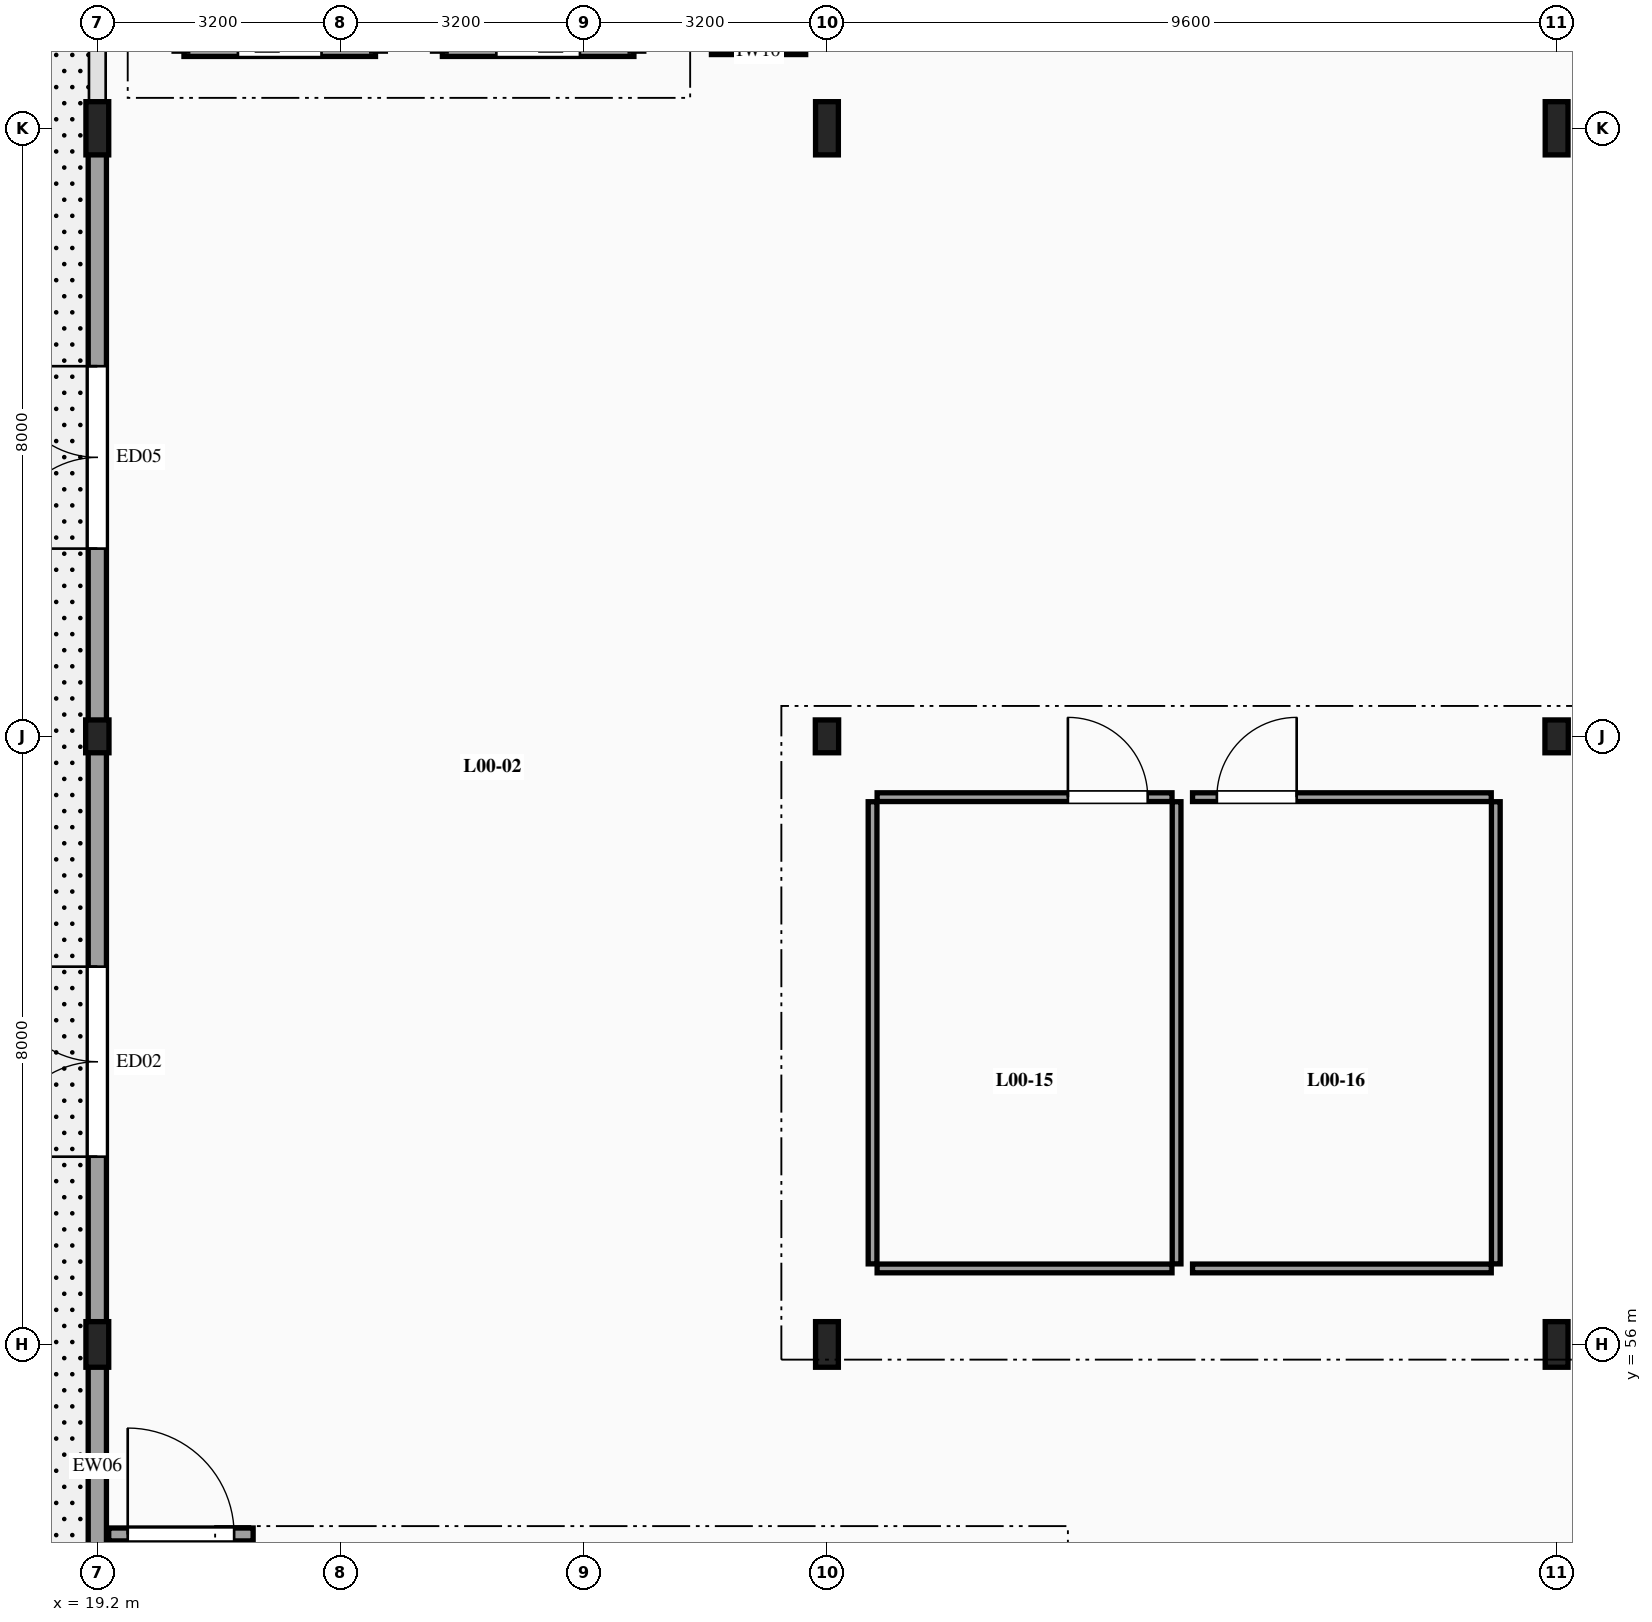
"""IFC4 building model, lengths in metres.
Left out: names, types, materials, properties, quantities, classifications, styles, units other than length and angle.
Written with IfcOpenShell. Run it as: python <this file> out.ifc"""

import sys

from ifc_helpers import new_model, si_unit, direction, frame, frame_2d, origin, origin_2d, place, context, subcontext, project, spatial, rectangle, i_section, extrude, element, fill, save


model = new_model("IFC4")
c1 = context("Model", 3, precision=1e-05, world=origin(), true_north=direction((0.0, 1.0)))
c2 = subcontext(c1, "Body", "Model", "MODEL_VIEW")
j1 = project(units=[si_unit("LENGTHUNIT", "METRE"), si_unit("PLANEANGLEUNIT", "RADIAN")], contexts=[c1])
p1 = place(None, origin())
s1 = spatial("IfcSite", under=j1, at=p1, CompositionType="ELEMENT")
p2 = place(p1, origin())
s2 = spatial("IfcBuilding", under=s1, at=p2, CompositionType="ELEMENT")
p3 = place(p2, origin())
s3 = spatial("IfcBuildingStorey", under=s2, at=p3, CompositionType="ELEMENT", Elevation=0.0)
p4 = place(p3, frame((19.2, 56.0, -0.28), z_axis=(0.0, 0.0, 1.0), x_axis=(1.0, 0.0, 0.0)))
e1 = element("IfcColumn", 1, at=p4, inside=s3, PredefinedType="COLUMN", context=c2, shape_type="SweptSolid", body=[
    extrude(i_section(OverallWidth=0.3, OverallDepth=0.6, WebThickness=0.015, FlangeThickness=0.03, FilletRadius=0.027, at=origin_2d()), origin(), (0.0, 0.0, 1.0), 4.52),
])
p5 = place(p3, frame((19.2, 64.0, -0.28), z_axis=(0.0, 0.0, 1.0), x_axis=(1.0, 0.0, 0.0)))
e2 = element("IfcColumn", 2, at=p5, inside=s3, PredefinedType="COLUMN", context=c2, shape_type="SweptSolid", body=[
    extrude(i_section(OverallWidth=0.307, OverallDepth=0.432, WebThickness=0.021, FlangeThickness=0.04, FilletRadius=0.027, at=origin_2d()), origin(), (0.0, 0.0, 1.0), 4.52),
])
p6 = place(p3, frame((19.2, 72.0, -0.28), z_axis=(0.0, 0.0, 1.0), x_axis=(1.0, 0.0, 0.0)))
e3 = element("IfcColumn", 3, at=p6, inside=s3, PredefinedType="COLUMN", context=c2, shape_type="SweptSolid", body=[
    extrude(i_section(OverallWidth=0.3, OverallDepth=0.7, WebThickness=0.017, FlangeThickness=0.032, FilletRadius=0.027, at=origin_2d()), origin(), (0.0, 0.0, 1.0), 4.52),
])
p7 = place(p3, frame((28.8, 56.0, -0.28), z_axis=(0.0, 0.0, 1.0), x_axis=(1.0, 0.0, 0.0)))
e4 = element("IfcColumn", 4, at=p7, inside=s3, PredefinedType="COLUMN", context=c2, shape_type="SweptSolid", body=[
    extrude(i_section(OverallWidth=0.3, OverallDepth=0.6, WebThickness=0.015, FlangeThickness=0.03, FilletRadius=0.027, at=origin_2d()), origin(), (0.0, 0.0, 1.0), 4.52),
])
p8 = place(p3, frame((28.8, 64.0, -0.28), z_axis=(0.0, 0.0, 1.0), x_axis=(1.0, 0.0, 0.0)))
e5 = element("IfcColumn", 5, at=p8, inside=s3, PredefinedType="COLUMN", context=c2, shape_type="SweptSolid", body=[
    extrude(i_section(OverallWidth=0.307, OverallDepth=0.432, WebThickness=0.021, FlangeThickness=0.04, FilletRadius=0.027, at=origin_2d()), origin(), (0.0, 0.0, 1.0), 4.52),
])
p9 = place(p3, frame((28.8, 72.0, -0.28), z_axis=(0.0, 0.0, 1.0), x_axis=(1.0, 0.0, 0.0)))
e6 = element("IfcColumn", 6, at=p9, inside=s3, PredefinedType="COLUMN", context=c2, shape_type="SweptSolid", body=[
    extrude(i_section(OverallWidth=0.3, OverallDepth=0.7, WebThickness=0.017, FlangeThickness=0.032, FilletRadius=0.027, at=origin_2d()), origin(), (0.0, 0.0, 1.0), 4.52),
])
p10 = place(p3, frame((38.4, 56.0, -0.28), z_axis=(0.0, 0.0, 1.0), x_axis=(1.0, 0.0, 0.0)))
e7 = element("IfcColumn", 7, at=p10, inside=s3, PredefinedType="COLUMN", context=c2, shape_type="SweptSolid", body=[
    extrude(i_section(OverallWidth=0.3, OverallDepth=0.6, WebThickness=0.015, FlangeThickness=0.03, FilletRadius=0.027, at=origin_2d()), origin(), (0.0, 0.0, 1.0), 4.52),
])
p11 = place(p3, frame((38.4, 64.0, -0.28), z_axis=(0.0, 0.0, 1.0), x_axis=(1.0, 0.0, 0.0)))
e8 = element("IfcColumn", 8, at=p11, inside=s3, PredefinedType="COLUMN", context=c2, shape_type="SweptSolid", body=[
    extrude(i_section(OverallWidth=0.307, OverallDepth=0.432, WebThickness=0.021, FlangeThickness=0.04, FilletRadius=0.027, at=origin_2d()), origin(), (0.0, 0.0, 1.0), 4.52),
])
p12 = place(p3, frame((38.4, 72.0, -0.28), z_axis=(0.0, 0.0, 1.0), x_axis=(1.0, 0.0, 0.0)))
e9 = element("IfcColumn", 9, at=p12, inside=s3, PredefinedType="COLUMN", context=c2, shape_type="SweptSolid", body=[
    extrude(i_section(OverallWidth=0.3, OverallDepth=0.7, WebThickness=0.017, FlangeThickness=0.032, FilletRadius=0.027, at=origin_2d()), origin(), (0.0, 0.0, 1.0), 4.52),
])
p13 = place(p3, frame((19.2, 48.02, 0.0), z_axis=(0.0, 0.0, 1.0), x_axis=(0.0, 1.0, 0.0)))
e10 = element("IfcWall", 10, at=p13, inside=s3, PredefinedType="SOLIDWALL", context=c2, shape_type="SweptSolid", body=[
    extrude(rectangle(XDim=7.96, YDim=0.24, at=frame_2d((3.98, 0.0))), origin(), (0.0, 0.0, 1.0), 3.56),
])
p14 = place(p13, frame((2.45, 0.0, 0.0)))
e11 = element("IfcOpeningElement", 11, at=p14, cuts=e10, PredefinedType="OPENING", context=c2, shape_type="SweptSolid", body=[
    extrude(rectangle(XDim=2.1, YDim=2.4, at=frame_2d((1.05, 1.2))), frame((0.0, 0.13, 0.0), z_axis=(0.0, -1.0, 0.0), x_axis=(1.0, 0.0, 0.0)), (0.0, 0.0, 1.0), 0.26),
])
p15 = place(p3, frame((19.2, 56.02, 0.0), z_axis=(0.0, 0.0, 1.0), x_axis=(0.0, 1.0, 0.0)))
e12 = element("IfcWall", 12, at=p15, inside=s3, PredefinedType="SOLIDWALL", context=c2, shape_type="SweptSolid", body=[
    extrude(rectangle(XDim=7.96, YDim=0.24, at=frame_2d((3.98, 0.0))), origin(), (0.0, 0.0, 1.0), 3.56),
])
p16 = place(p15, frame((2.45, 0.0, 0.0)))
e13 = element("IfcOpeningElement", 13, at=p16, cuts=e12, PredefinedType="OPENING", context=c2, shape_type="SweptSolid", body=[
    extrude(rectangle(XDim=2.5, YDim=2.5, at=frame_2d((1.25, 1.25))), frame((0.0, 0.13, 0.0), z_axis=(0.0, -1.0, 0.0), x_axis=(1.0, 0.0, 0.0)), (0.0, 0.0, 1.0), 0.26),
])
p17 = place(p3, frame((19.2, 64.02, 0.0), z_axis=(0.0, 0.0, 1.0), x_axis=(0.0, 1.0, 0.0)))
e14 = element("IfcWall", 14, at=p17, inside=s3, PredefinedType="SOLIDWALL", context=c2, shape_type="SweptSolid", body=[
    extrude(rectangle(XDim=7.96, YDim=0.24, at=frame_2d((3.98, 0.0))), origin(), (0.0, 0.0, 1.0), 3.56),
])
p18 = place(p17, frame((2.45, 0.0, 0.0)))
e15 = element("IfcOpeningElement", 15, at=p18, cuts=e14, PredefinedType="OPENING", context=c2, shape_type="SweptSolid", body=[
    extrude(rectangle(XDim=2.4, YDim=2.55, at=frame_2d((1.2, 1.275))), frame((0.0, 0.13, 0.0), z_axis=(0.0, -1.0, 0.0), x_axis=(1.0, 0.0, 0.0)), (0.0, 0.0, 1.0), 0.26),
])
p19 = place(p3, frame((19.35, 53.5, 0.0), z_axis=(0.0, 0.0, 1.0), x_axis=(1.0, 0.0, 0.0)))
e16 = element("IfcWall", 16, at=p19, inside=s3, PredefinedType="SOLIDWALL", context=c2, shape_type="SweptSolid", body=[
    extrude(rectangle(XDim=1.9, YDim=0.17, at=frame_2d((0.95, 0.0))), origin(), (0.0, 0.0, 1.0), 3.6),
])
p20 = place(p19, frame((0.25, 0.0, 0.0)))
e17 = element("IfcOpeningElement", 17, at=p20, cuts=e16, PredefinedType="OPENING", context=c2, shape_type="SweptSolid", body=[
    extrude(rectangle(XDim=1.4, YDim=2.15, at=frame_2d((0.7, 1.075))), frame((0.0, 0.095, 0.0), z_axis=(0.0, -1.0, 0.0), x_axis=(1.0, 0.0, 0.0)), (0.0, 0.0, 1.0), 0.19),
])
p21 = place(p3, frame((20.34, 73.06, 0.0), z_axis=(0.0, 0.0, 1.0), x_axis=(1.0, 0.0, 0.0)))
e18 = element("IfcWall", 18, at=p21, inside=s3, PredefinedType="SOLIDWALL", context=c2, shape_type="SweptSolid", body=[
    extrude(rectangle(XDim=2.52, YDim=0.23, at=frame_2d((1.26, 0.0))), origin(), (0.0, 0.0, 1.0), 3.6),
])
p22 = place(p21, frame((0.71, 0.0, 0.0)))
e19 = element("IfcOpeningElement", 19, at=p22, cuts=e18, PredefinedType="OPENING", context=c2, shape_type="SweptSolid", body=[
    extrude(rectangle(XDim=1.1, YDim=2.2, at=frame_2d((0.55, 1.1))), frame((0.0, 0.125, 0.0), z_axis=(0.0, -1.0, 0.0), x_axis=(1.0, 0.0, 0.0)), (0.0, 0.0, 1.0), 0.25),
])
p23 = place(p3, frame((23.74, 73.06, 0.0), z_axis=(0.0, 0.0, 1.0), x_axis=(1.0, 0.0, 0.0)))
e20 = element("IfcWall", 20, at=p23, inside=s3, PredefinedType="SOLIDWALL", context=c2, shape_type="SweptSolid", body=[
    extrude(rectangle(XDim=2.52, YDim=0.23, at=frame_2d((1.26, 0.0))), origin(), (0.0, 0.0, 1.0), 3.6),
])
p24 = place(p23, frame((0.71, 0.0, 0.0)))
e21 = element("IfcOpeningElement", 21, at=p24, cuts=e20, PredefinedType="OPENING", context=c2, shape_type="SweptSolid", body=[
    extrude(rectangle(XDim=1.1, YDim=2.2, at=frame_2d((0.55, 1.1))), frame((0.0, 0.125, 0.0), z_axis=(0.0, -1.0, 0.0), x_axis=(1.0, 0.0, 0.0)), (0.0, 0.0, 1.0), 0.25),
])
p25 = place(p3, frame((29.46, 63.2, 0.0), z_axis=(0.0, 0.0, 1.0), x_axis=(1.0, 0.0, 0.0)))
e22 = element("IfcWall", 22, at=p25, inside=s3, PredefinedType="PARTITIONING", context=c2, shape_type="SweptSolid", body=[
    extrude(rectangle(XDim=3.88, YDim=0.115, at=frame_2d((1.94, 0.0))), origin(), (0.0, 0.0, 1.0), 3.6),
])
p26 = place(p25, frame((2.51, 0.0, 0.0)))
e23 = element("IfcOpeningElement", 23, at=p26, cuts=e22, PredefinedType="OPENING", context=c2, shape_type="SweptSolid", body=[
    extrude(rectangle(XDim=1.05, YDim=2.15, at=frame_2d((0.525, 1.075))), frame((0.0, 0.067, 0.0), z_axis=(0.0, -1.0, 0.0), x_axis=(1.0, 0.0, 0.0)), (0.0, 0.0, 1.0), 0.135),
])
p27 = place(p3, frame((29.46, 57.0, 0.0), z_axis=(0.0, 0.0, 1.0), x_axis=(1.0, 0.0, 0.0)))
e24 = element("IfcWall", 24, at=p27, inside=s3, PredefinedType="PARTITIONING", context=c2, shape_type="SweptSolid", body=[
    extrude(rectangle(XDim=3.88, YDim=0.115, at=frame_2d((1.94, 0.0))), origin(), (0.0, 0.0, 1.0), 3.6),
])
for number, where, z_axis, x_axis in (
    (25, (29.4, 57.06, 0.0), (0.0, 0.0, 1.0), (0.0, 1.0, 0.0)),
    (26, (33.4, 57.06, 0.0), (0.0, 0.0, 1.0), (0.0, 1.0, 0.0)),
):
    element("IfcWall", number, at=place(p3, frame(where, z_axis=z_axis, x_axis=x_axis)), inside=s3, PredefinedType="PARTITIONING", context=c2, shape_type="SweptSolid", body=[
        extrude(rectangle(XDim=6.08, YDim=0.115, at=frame_2d((3.04, 0.0))), origin(), (0.0, 0.0, 1.0), 3.6),
    ])
p28 = place(p3, frame((33.61, 63.2, 0.0), z_axis=(0.0, 0.0, 1.0), x_axis=(1.0, 0.0, 0.0)))
e27 = element("IfcWall", 27, at=p28, inside=s3, PredefinedType="PARTITIONING", context=c2, shape_type="SweptSolid", body=[
    extrude(rectangle(XDim=3.93, YDim=0.115, at=frame_2d((1.965, 0.0))), origin(), (0.0, 0.0, 1.0), 3.6),
])
p29 = place(p28, frame((0.32, 0.0, 0.0)))
e28 = element("IfcOpeningElement", 28, at=p29, cuts=e27, PredefinedType="OPENING", context=c2, shape_type="SweptSolid", body=[
    extrude(rectangle(XDim=1.05, YDim=2.15, at=frame_2d((0.525, 1.075))), frame((0.0, 0.067, 0.0), z_axis=(0.0, -1.0, 0.0), x_axis=(1.0, 0.0, 0.0)), (0.0, 0.0, 1.0), 0.135),
])
p30 = place(p3, frame((33.61, 57.0, 0.0), z_axis=(0.0, 0.0, 1.0), x_axis=(1.0, 0.0, 0.0)))
e29 = element("IfcWall", 29, at=p30, inside=s3, PredefinedType="PARTITIONING", context=c2, shape_type="SweptSolid", body=[
    extrude(rectangle(XDim=3.93, YDim=0.115, at=frame_2d((1.965, 0.0))), origin(), (0.0, 0.0, 1.0), 3.6),
])
p31 = place(p3, frame((37.6, 57.06, 0.0), z_axis=(0.0, 0.0, 1.0), x_axis=(0.0, 1.0, 0.0)))
e30 = element("IfcWall", 30, at=p31, inside=s3, PredefinedType="PARTITIONING", context=c2, shape_type="SweptSolid", body=[
    extrude(rectangle(XDim=6.08, YDim=0.115, at=frame_2d((3.04, 0.0))), origin(), (0.0, 0.0, 1.0), 3.6),
])
p32 = place(p3, frame((27.28, 73.02, 0.0), z_axis=(0.0, 0.0, 1.0), x_axis=(1.0, 0.0, 0.0)))
e31 = element("IfcWall", 31, at=p32, inside=s3, PredefinedType="PARTITIONING", context=c2, shape_type="SweptSolid", body=[
    extrude(rectangle(XDim=1.24, YDim=0.1, at=frame_2d((0.62, 0.0))), origin(), (0.0, 0.0, 1.0), 3.6),
])
p33 = place(p16, origin())
e32 = element("IfcDoor", 32, at=p33, inside=s3, OperationType="DOUBLE_DOOR_SINGLE_SWING", PredefinedType="DOOR", context=c2, shape_type="SweptSolid", body=[
    extrude(rectangle(XDim=2.5, YDim=2.5, at=frame_2d((1.25, 1.25))), frame((0.0, 0.025, 0.0), z_axis=(0.0, -1.0, 0.0), x_axis=(1.0, 0.0, 0.0)), (0.0, 0.0, 1.0), 0.05),
])
fill(e13, e32)
p34 = place(p18, origin())
e33 = element("IfcDoor", 33, at=p34, inside=s3, OperationType="DOUBLE_DOOR_SINGLE_SWING", PredefinedType="DOOR", context=c2, shape_type="SweptSolid", body=[
    extrude(rectangle(XDim=2.4, YDim=2.55, at=frame_2d((1.2, 1.275))), frame((0.0, 0.025, 0.0), z_axis=(0.0, -1.0, 0.0), x_axis=(1.0, 0.0, 0.0)), (0.0, 0.0, 1.0), 0.05),
])
fill(e15, e33)
p35 = place(p20, origin())
e34 = element("IfcDoor", 34, at=p35, inside=s3, OperationType="SINGLE_SWING_LEFT", PredefinedType="DOOR", context=c2, shape_type="SweptSolid", body=[
    extrude(rectangle(XDim=1.4, YDim=2.15, at=frame_2d((0.7, 1.075))), frame((0.0, 0.025, 0.0), z_axis=(0.0, -1.0, 0.0), x_axis=(1.0, 0.0, 0.0)), (0.0, 0.0, 1.0), 0.05),
])
fill(e17, e34)
p36 = place(p26, origin())
e35 = element("IfcDoor", 35, at=p36, inside=s3, OperationType="SINGLE_SWING_LEFT", PredefinedType="DOOR", context=c2, shape_type="SweptSolid", body=[
    extrude(rectangle(XDim=1.05, YDim=2.15, at=frame_2d((0.525, 1.075))), frame((0.0, 0.025, 0.0), z_axis=(0.0, -1.0, 0.0), x_axis=(1.0, 0.0, 0.0)), (0.0, 0.0, 1.0), 0.05),
])
fill(e23, e35)
p37 = place(p29, origin())
e36 = element("IfcDoor", 36, at=p37, inside=s3, OperationType="SINGLE_SWING_RIGHT", PredefinedType="DOOR", context=c2, shape_type="SweptSolid", body=[
    extrude(rectangle(XDim=1.05, YDim=2.15, at=frame_2d((0.525, 1.075))), frame((0.0, 0.025, 0.0), z_axis=(0.0, -1.0, 0.0), x_axis=(1.0, 0.0, 0.0)), (0.0, 0.0, 1.0), 0.05),
])
fill(e28, e36)
save(model, sys.argv[1])
